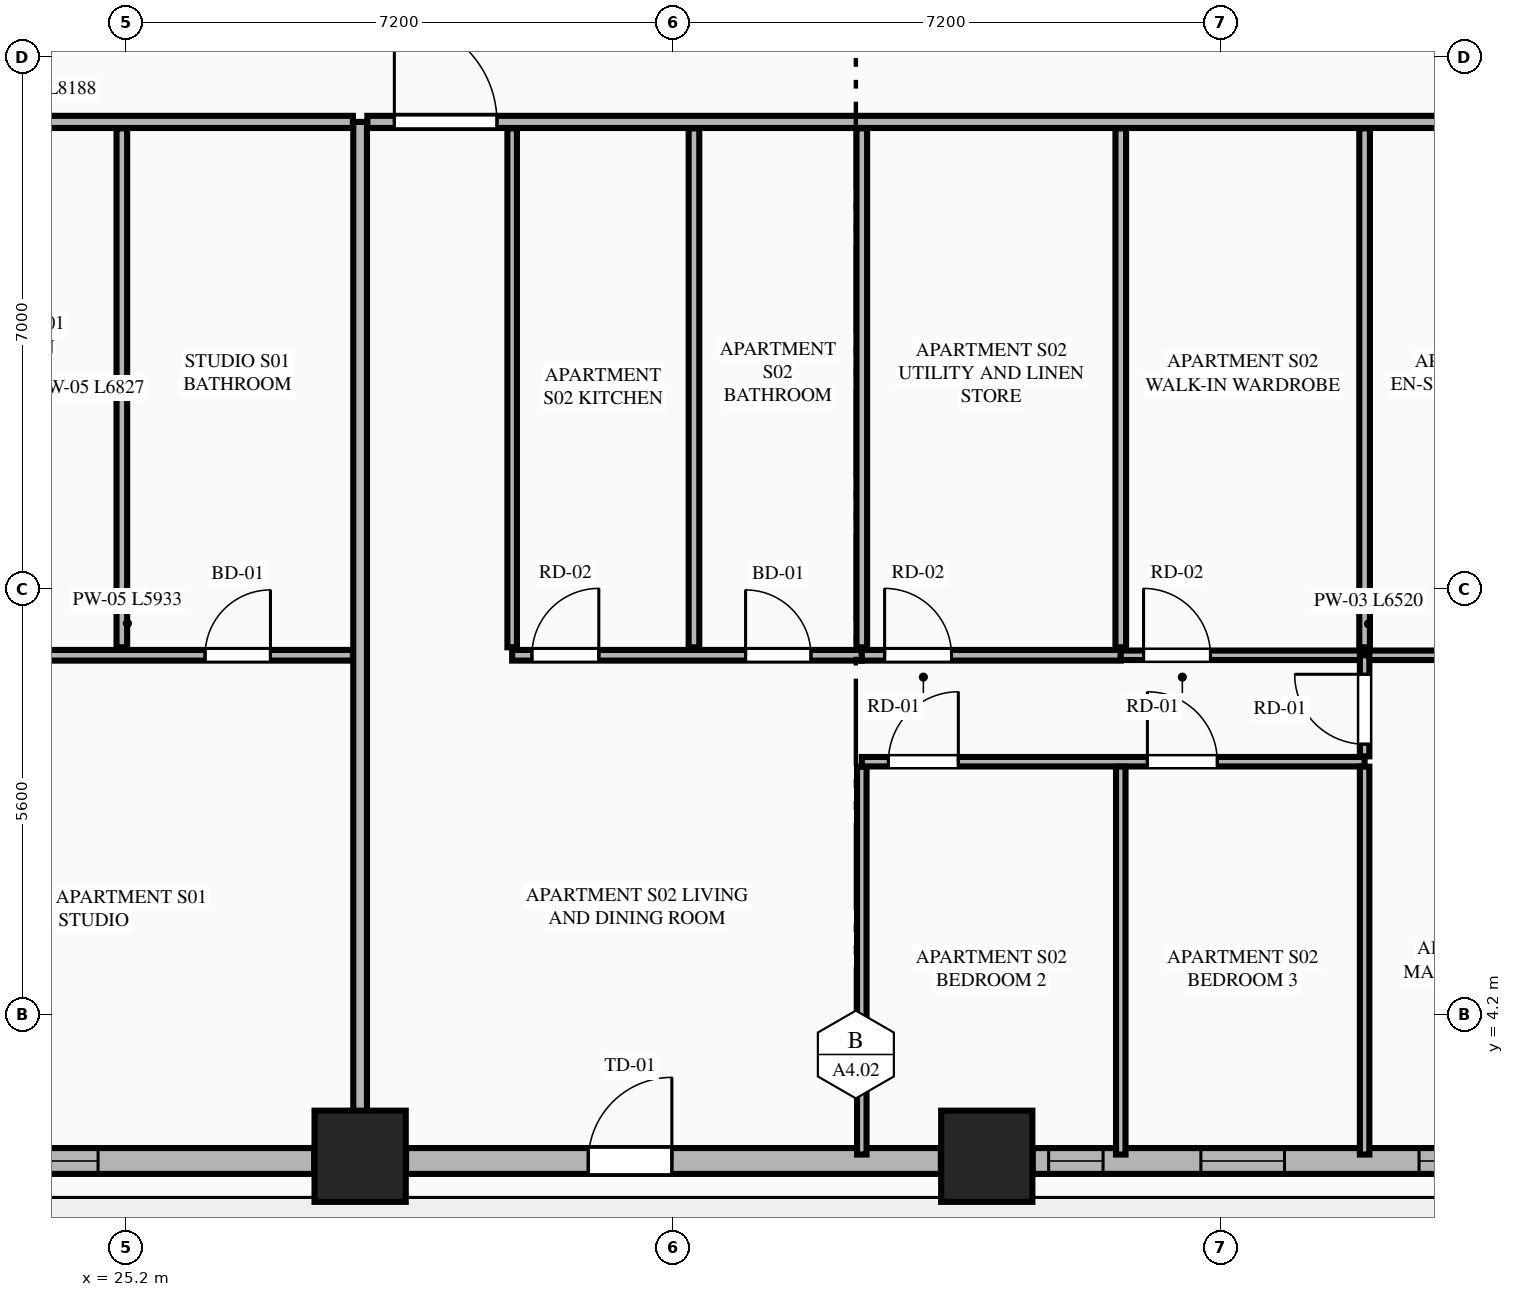
"""IFC4 building model, lengths in metres.
Left out: names, types, materials, properties, quantities, classifications, styles, units other than length and angle.
Written with IfcOpenShell. Run it as: python <this file> out.ifc"""

import sys

from ifc_helpers import new_model, si_unit, direction, frame, frame_2d, origin, origin_2d, place, context, subcontext, project, spatial, rectangle, extrude, element, fill, save


model = new_model("IFC4")
c1 = context("Model", 3, precision=1e-05, world=origin(), true_north=direction((0.0, 1.0)))
c2 = subcontext(c1, "Body", "Model", "MODEL_VIEW")
j1 = project(units=[si_unit("LENGTHUNIT", "METRE"), si_unit("PLANEANGLEUNIT", "RADIAN")], contexts=[c1])
p1 = place(None, origin())
s1 = spatial("IfcSite", under=j1, at=p1, CompositionType="ELEMENT")
p2 = place(p1, origin())
s2 = spatial("IfcBuilding", under=s1, at=p2, CompositionType="ELEMENT")
p3 = place(p2, frame((0.0, 0.0, 32.0)))
s3 = spatial("IfcBuildingStorey", under=s2, at=p3, CompositionType="ELEMENT", Elevation=32.0)
for number, where, z_axis, x_axis in (
    (1, (28.278, 2.342, 0.0), (0.0, 0.0, 1.0), (1.0, 0.0, 0.0)),
    (2, (36.522, 2.342, 0.0), (0.0, 0.0, 1.0), (1.0, 0.0, 0.0)),
):
    element("IfcColumn", number, at=place(p3, frame(where, z_axis=z_axis, x_axis=x_axis)), inside=s3, PredefinedType="COLUMN", context=c2, shape_type="SweptSolid", body=[
        extrude(rectangle(XDim=1.2, YDim=1.2, at=origin_2d()), origin(), (0.0, 0.0, 1.0), 3.55),
    ])
p4 = place(p3, frame((20.887, 2.28, 0.0), z_axis=(0.0, 0.0, 1.0), x_axis=(1.0, 0.0, 0.0)))
e3 = element("IfcWall", 3, at=p4, inside=s3, PredefinedType="STANDARD", context=c2, shape_type="SweptSolid", body=[
    extrude(rectangle(XDim=6.787, YDim=0.34, at=frame_2d((3.394, 0.0))), origin(), (0.0, 0.0, 1.0), 2.787),
])
p5 = place(p4, frame((2.843, 0.0, 0.75)))
e4 = element("IfcOpeningElement", 4, at=p5, cuts=e3, PredefinedType="OPENING", context=c2, shape_type="SweptSolid", body=[
    extrude(rectangle(XDim=1.1, YDim=1.887, at=frame_2d((0.55, 0.943))), frame((0.0, 0.18, 0.0), z_axis=(0.0, -1.0, 0.0), x_axis=(1.0, 0.0, 0.0)), (0.0, 0.0, 1.0), 0.36),
])
p6 = place(p3, frame((28.882, 2.28, 0.0), z_axis=(0.0, 0.0, 1.0), x_axis=(1.0, 0.0, 0.0)))
e5 = element("IfcWall", 5, at=p6, inside=s3, PredefinedType="STANDARD", context=c2, shape_type="SweptSolid", body=[
    extrude(rectangle(XDim=7.036, YDim=0.34, at=frame_2d((3.518, 0.0))), origin(), (0.0, 0.0, 1.0), 2.787),
])
p7 = place(p6, frame((2.397, 0.0, 0.0)))
e6 = element("IfcOpeningElement", 6, at=p7, cuts=e5, PredefinedType="OPENING", context=c2, shape_type="SweptSolid", body=[
    extrude(rectangle(XDim=1.1, YDim=2.25, at=frame_2d((0.55, 1.125))), frame((0.0, 0.18, 0.0), z_axis=(0.0, -1.0, 0.0), x_axis=(1.0, 0.0, 0.0)), (0.0, 0.0, 1.0), 0.36),
])
p8 = place(p3, frame((37.126, 2.28, 0.0), z_axis=(0.0, 0.0, 1.0), x_axis=(1.0, 0.0, 0.0)))
e7 = element("IfcWall", 7, at=p8, inside=s3, PredefinedType="STANDARD", context=c2, shape_type="SweptSolid", body=[
    extrude(rectangle(XDim=6.787, YDim=0.34, at=frame_2d((3.394, 0.0))), origin(), (0.0, 0.0, 1.0), 2.787),
])
p9 = place(p8, frame((2.213, 0.0, 0.75)))
e8 = element("IfcOpeningElement", 8, at=p9, cuts=e7, PredefinedType="OPENING", context=c2, shape_type="SweptSolid", body=[
    extrude(rectangle(XDim=1.1, YDim=1.887, at=frame_2d((0.55, 0.943))), frame((0.0, 0.18, 0.0), z_axis=(0.0, -1.0, 0.0), x_axis=(1.0, 0.0, 0.0)), (0.0, 0.0, 1.0), 0.36),
])
p10 = place(p8, frame((5.083, 0.0, 0.75)))
e9 = element("IfcOpeningElement", 9, at=p10, cuts=e7, PredefinedType="OPENING", context=c2, shape_type="SweptSolid", body=[
    extrude(rectangle(XDim=1.1, YDim=1.887, at=frame_2d((0.55, 0.943))), frame((0.0, 0.18, 0.0), z_axis=(0.0, -1.0, 0.0), x_axis=(1.0, 0.0, 0.0)), (0.0, 0.0, 1.0), 0.36),
])
p11 = place(p8, frame((0.21, 0.0, 0.75)))
e10 = element("IfcOpeningElement", 10, at=p11, cuts=e7, PredefinedType="OPENING", context=c2, shape_type="SweptSolid", body=[
    extrude(rectangle(XDim=0.716, YDim=1.887, at=frame_2d((0.358, 0.943))), frame((0.0, 0.18, 0.0), z_axis=(0.0, -1.0, 0.0), x_axis=(1.0, 0.0, 0.0)), (0.0, 0.0, 1.0), 0.36),
])
p12 = place(p3, frame((28.278, 2.455, 0.0), z_axis=(0.0, 0.0, 1.0), x_axis=(0.0, 1.0, 0.0)))
e11 = element("IfcWall", 11, at=p12, inside=s3, PredefinedType="PARTITIONING", context=c2, shape_type="SweptSolid", body=[
    extrude(rectangle(XDim=13.495, YDim=0.18, at=frame_2d((6.748, 0.0))), origin(), (0.0, 0.0, 1.0), 2.636),
])
p13 = place(p3, frame((19.995, 15.95, 0.0), z_axis=(0.0, 0.0, 1.0), x_axis=(1.0, 0.0, 0.0)))
e12 = element("IfcWall", 12, at=p13, inside=s3, PredefinedType="PARTITIONING", context=c2, shape_type="SweptSolid", body=[
    extrude(rectangle(XDim=8.188, YDim=0.16, at=frame_2d((4.094, 0.0))), origin(), (0.0, 0.0, 1.0), 3.33),
])
p14 = place(p13, frame((0.705, 0.0, 0.0)))
e13 = element("IfcOpeningElement", 13, at=p14, cuts=e12, PredefinedType="OPENING", context=c2, shape_type="SweptSolid", body=[
    extrude(rectangle(XDim=1.02, YDim=2.25, at=frame_2d((0.51, 1.125))), frame((0.0, 0.09, 0.0), z_axis=(0.0, -1.0, 0.0), x_axis=(1.0, 0.0, 0.0)), (0.0, 0.0, 1.0), 0.18),
])
p15 = place(p3, frame((22.25, 8.933, 0.0), z_axis=(0.0, 0.0, 1.0), x_axis=(1.0, 0.0, 0.0)))
e14 = element("IfcWall", 14, at=p15, inside=s3, PredefinedType="PLUMBINGWALL", context=c2, shape_type="SweptSolid", body=[
    extrude(rectangle(XDim=5.933, YDim=0.14, at=frame_2d((2.967, 0.0))), origin(), (0.0, 0.0, 1.0), 3.33),
])
p16 = place(p15, frame((3.988, 0.0, 0.0)))
e15 = element("IfcOpeningElement", 15, at=p16, cuts=e14, PredefinedType="OPENING", context=c2, shape_type="SweptSolid", body=[
    extrude(rectangle(XDim=0.86, YDim=2.1, at=frame_2d((0.43, 1.05))), frame((0.0, 0.08, 0.0), z_axis=(0.0, -1.0, 0.0), x_axis=(1.0, 0.0, 0.0)), (0.0, 0.0, 1.0), 0.16),
])
p17 = place(p15, frame((0.22, 0.0, 0.0)))
e16 = element("IfcOpeningElement", 16, at=p17, cuts=e14, PredefinedType="OPENING", context=c2, shape_type="SweptSolid", body=[
    extrude(rectangle(XDim=0.88, YDim=2.15, at=frame_2d((0.44, 1.075))), frame((0.0, 0.08, 0.0), z_axis=(0.0, -1.0, 0.0), x_axis=(1.0, 0.0, 0.0)), (0.0, 0.0, 1.0), 0.16),
])
p18 = place(p3, frame((25.143, 9.038, 0.0), z_axis=(0.0, 0.0, 1.0), x_axis=(0.0, 1.0, 0.0)))
e17 = element("IfcWall", 17, at=p18, inside=s3, PredefinedType="PLUMBINGWALL", context=c2, shape_type="SweptSolid", body=[
    extrude(rectangle(XDim=6.827, YDim=0.14, at=frame_2d((3.414, 0.0))), origin(), (0.0, 0.0, 1.0), 3.33),
])
p19 = place(p3, frame((28.373, 15.95, 0.0), z_axis=(0.0, 0.0, 1.0), x_axis=(1.0, 0.0, 0.0)))
e18 = element("IfcWall", 18, at=p19, inside=s3, PredefinedType="PARTITIONING", context=c2, shape_type="SweptSolid", body=[
    extrude(rectangle(XDim=16.432, YDim=0.16, at=frame_2d((8.216, 0.0))), origin(), (0.0, 0.0, 1.0), 3.33),
])
p20 = place(p19, frame((0.355, 0.0, 0.0)))
e19 = element("IfcOpeningElement", 19, at=p20, cuts=e18, PredefinedType="OPENING", context=c2, shape_type="SweptSolid", body=[
    extrude(rectangle(XDim=1.35, YDim=2.35, at=frame_2d((0.675, 1.175))), frame((0.0, 0.09, 0.0), z_axis=(0.0, -1.0, 0.0), x_axis=(1.0, 0.0, 0.0)), (0.0, 0.0, 1.0), 0.18),
])
p21 = place(p3, frame((30.278, 9.038, 0.0), z_axis=(0.0, 0.0, 1.0), x_axis=(0.0, 1.0, 0.0)))
e20 = element("IfcWall", 20, at=p21, inside=s3, PredefinedType="PARTITIONING", context=c2, shape_type="SweptSolid", body=[
    extrude(rectangle(XDim=6.827, YDim=0.125, at=frame_2d((3.414, 0.0))), origin(), (0.0, 0.0, 1.0), 3.33),
])
p22 = place(p3, frame((30.278, 8.933, 0.0), z_axis=(0.0, 0.0, 1.0), x_axis=(1.0, 0.0, 0.0)))
e21 = element("IfcWall", 21, at=p22, inside=s3, PredefinedType="PLUMBINGWALL", context=c2, shape_type="SweptSolid", body=[
    extrude(rectangle(XDim=4.6, YDim=0.14, at=frame_2d((2.3, 0.0))), origin(), (0.0, 0.0, 1.0), 3.33),
])
p23 = place(p22, frame((3.071, 0.0, 0.0)))
e22 = element("IfcOpeningElement", 22, at=p23, cuts=e21, PredefinedType="OPENING", context=c2, shape_type="SweptSolid", body=[
    extrude(rectangle(XDim=0.86, YDim=2.1, at=frame_2d((0.43, 1.05))), frame((0.0, 0.08, 0.0), z_axis=(0.0, -1.0, 0.0), x_axis=(1.0, 0.0, 0.0)), (0.0, 0.0, 1.0), 0.16),
])
p24 = place(p22, frame((0.26, 0.0, 0.0)))
e23 = element("IfcOpeningElement", 23, at=p24, cuts=e21, PredefinedType="OPENING", context=c2, shape_type="SweptSolid", body=[
    extrude(rectangle(XDim=0.88, YDim=2.15, at=frame_2d((0.44, 1.075))), frame((0.0, 0.08, 0.0), z_axis=(0.0, -1.0, 0.0), x_axis=(1.0, 0.0, 0.0)), (0.0, 0.0, 1.0), 0.16),
])
p25 = place(p3, frame((34.878, 8.933, 0.0), z_axis=(0.0, 0.0, 1.0), x_axis=(1.0, 0.0, 0.0)))
e24 = element("IfcWall", 24, at=p25, inside=s3, PredefinedType="PLUMBINGWALL", context=c2, shape_type="SweptSolid", body=[
    extrude(rectangle(XDim=3.407, YDim=0.14, at=frame_2d((1.704, 0.0))), origin(), (0.0, 0.0, 1.0), 3.33),
])
p26 = place(p25, frame((0.3, 0.0, 0.0)))
e25 = element("IfcOpeningElement", 25, at=p26, cuts=e24, PredefinedType="OPENING", context=c2, shape_type="SweptSolid", body=[
    extrude(rectangle(XDim=0.88, YDim=2.15, at=frame_2d((0.44, 1.075))), frame((0.0, 0.08, 0.0), z_axis=(0.0, -1.0, 0.0), x_axis=(1.0, 0.0, 0.0)), (0.0, 0.0, 1.0), 0.16),
])
p27 = place(p3, frame((38.285, 8.933, 0.0), z_axis=(0.0, 0.0, 1.0), x_axis=(1.0, 0.0, 0.0)))
e26 = element("IfcWall", 26, at=p27, inside=s3, PredefinedType="PARTITIONING", context=c2, shape_type="SweptSolid", body=[
    extrude(rectangle(XDim=6.52, YDim=0.125, at=frame_2d((3.26, 0.0))), origin(), (0.0, 0.0, 1.0), 3.33),
])
p28 = place(p27, frame((4.439, 0.0, 0.0)))
e27 = element("IfcOpeningElement", 27, at=p28, cuts=e26, PredefinedType="OPENING", context=c2, shape_type="SweptSolid", body=[
    extrude(rectangle(XDim=0.86, YDim=2.1, at=frame_2d((0.43, 1.05))), frame((0.0, 0.073, 0.0), z_axis=(0.0, -1.0, 0.0), x_axis=(1.0, 0.0, 0.0)), (0.0, 0.0, 1.0), 0.145),
])
p29 = place(p27, frame((0.3, 0.0, 0.0)))
e28 = element("IfcOpeningElement", 28, at=p29, cuts=e26, PredefinedType="OPENING", context=c2, shape_type="SweptSolid", body=[
    extrude(rectangle(XDim=0.88, YDim=2.15, at=frame_2d((0.44, 1.075))), frame((0.0, 0.073, 0.0), z_axis=(0.0, -1.0, 0.0), x_axis=(1.0, 0.0, 0.0)), (0.0, 0.0, 1.0), 0.145),
])
p30 = place(p3, frame((32.67, 9.038, 0.0), z_axis=(0.0, 0.0, 1.0), x_axis=(0.0, 1.0, 0.0)))
e29 = element("IfcWall", 29, at=p30, inside=s3, PredefinedType="PLUMBINGWALL", context=c2, shape_type="SweptSolid", body=[
    extrude(rectangle(XDim=6.827, YDim=0.14, at=frame_2d((3.414, 0.0))), origin(), (0.0, 0.0, 1.0), 3.33),
])
p31 = place(p3, frame((34.878, 2.365, 0.0), z_axis=(0.0, 0.0, 1.0), x_axis=(0.0, 1.0, 0.0)))
e30 = element("IfcWall", 30, at=p31, inside=s3, PredefinedType="PARTITIONING", context=c2, shape_type="SweptSolid", body=[
    extrude(rectangle(XDim=5.103, YDim=0.125, at=frame_2d((2.552, 0.0))), origin(), (0.0, 0.0, 1.0), 3.33),
])
p32 = place(p3, frame((34.878, 7.533, 0.0), z_axis=(0.0, 0.0, 1.0), x_axis=(1.0, 0.0, 0.0)))
e31 = element("IfcWall", 31, at=p32, inside=s3, PredefinedType="PARTITIONING", context=c2, shape_type="SweptSolid", body=[
    extrude(rectangle(XDim=6.615, YDim=0.125, at=frame_2d((3.308, 0.0))), origin(), (0.0, 0.0, 1.0), 3.33),
])
p33 = place(p32, frame((0.35, 0.0, 0.0)))
e32 = element("IfcOpeningElement", 32, at=p33, cuts=e31, PredefinedType="OPENING", context=c2, shape_type="SweptSolid", body=[
    extrude(rectangle(XDim=0.92, YDim=2.15, at=frame_2d((0.46, 1.075))), frame((0.0, 0.073, 0.0), z_axis=(0.0, -1.0, 0.0), x_axis=(1.0, 0.0, 0.0)), (0.0, 0.0, 1.0), 0.145),
])
p34 = place(p32, frame((3.757, 0.0, 0.0)))
e33 = element("IfcOpeningElement", 33, at=p34, cuts=e31, PredefinedType="OPENING", context=c2, shape_type="SweptSolid", body=[
    extrude(rectangle(XDim=0.92, YDim=2.15, at=frame_2d((0.46, 1.075))), frame((0.0, 0.073, 0.0), z_axis=(0.0, -1.0, 0.0), x_axis=(1.0, 0.0, 0.0)), (0.0, 0.0, 1.0), 0.145),
])
p35 = place(p3, frame((41.493, 7.603, 0.0), z_axis=(0.0, 0.0, 1.0), x_axis=(0.0, 1.0, 0.0)))
e34 = element("IfcWall", 34, at=p35, inside=s3, PredefinedType="PARTITIONING", context=c2, shape_type="SweptSolid", body=[
    extrude(rectangle(XDim=1.33, YDim=0.125, at=frame_2d((0.665, 0.0))), origin(), (0.0, 0.0, 1.0), 3.33),
])
p36 = place(p35, frame((0.16, 0.0, 0.0)))
e35 = element("IfcOpeningElement", 35, at=p36, cuts=e34, PredefinedType="OPENING", context=c2, shape_type="SweptSolid", body=[
    extrude(rectangle(XDim=0.92, YDim=2.15, at=frame_2d((0.46, 1.075))), frame((0.0, 0.073, 0.0), z_axis=(0.0, -1.0, 0.0), x_axis=(1.0, 0.0, 0.0)), (0.0, 0.0, 1.0), 0.145),
])
for number, where, z_axis, x_axis in (
    (36, (34.878, 9.038, 0.0), (0.0, 0.0, 1.0), (0.0, 1.0, 0.0)),
    (37, (38.285, 9.038, 0.0), (0.0, 0.0, 1.0), (0.0, 1.0, 0.0)),
):
    element("IfcWall", number, at=place(p3, frame(where, z_axis=z_axis, x_axis=x_axis)), inside=s3, PredefinedType="PLUMBINGWALL", context=c2, shape_type="SweptSolid", body=[
        extrude(rectangle(XDim=6.827, YDim=0.14, at=frame_2d((3.414, 0.0))), origin(), (0.0, 0.0, 1.0), 3.33),
    ])
for number, where, z_axis, x_axis in (
    (38, (38.285, 2.365, 0.0), (0.0, 0.0, 1.0), (0.0, 1.0, 0.0)),
    (39, (41.493, 2.365, 0.0), (0.0, 0.0, 1.0), (0.0, 1.0, 0.0)),
):
    element("IfcWall", number, at=place(p3, frame(where, z_axis=z_axis, x_axis=x_axis)), inside=s3, PredefinedType="PARTITIONING", context=c2, shape_type="SweptSolid", body=[
        extrude(rectangle(XDim=5.103, YDim=0.125, at=frame_2d((2.552, 0.0))), origin(), (0.0, 0.0, 1.0), 3.33),
    ])
p37 = place(p3, frame((41.493, 9.038, 0.0), z_axis=(0.0, 0.0, 1.0), x_axis=(0.0, 1.0, 0.0)))
e40 = element("IfcWall", 40, at=p37, inside=s3, PredefinedType="PLUMBINGWALL", context=c2, shape_type="SweptSolid", body=[
    extrude(rectangle(XDim=6.827, YDim=0.14, at=frame_2d((3.414, 0.0))), origin(), (0.0, 0.0, 1.0), 3.33),
])
p38 = place(p5, origin())
e41 = element("IfcWindow", 41, at=p38, inside=s3, PartitioningType="SINGLE_PANEL", PredefinedType="WINDOW", context=c2, shape_type="SweptSolid", body=[
    extrude(rectangle(XDim=1.1, YDim=1.887, at=frame_2d((0.55, 0.943))), frame((0.0, 0.03, 0.0), z_axis=(0.0, -1.0, 0.0), x_axis=(1.0, 0.0, 0.0)), (0.0, 0.0, 1.0), 0.06),
])
fill(e4, e41)
p39 = place(p7, origin())
e42 = element("IfcDoor", 42, at=p39, inside=s3, OperationType="SINGLE_SWING_RIGHT", PredefinedType="DOOR", context=c2, shape_type="SweptSolid", body=[
    extrude(rectangle(XDim=1.1, YDim=2.25, at=frame_2d((0.55, 1.125))), frame((0.0, 0.025, 0.0), z_axis=(0.0, -1.0, 0.0), x_axis=(1.0, 0.0, 0.0)), (0.0, 0.0, 1.0), 0.05),
])
fill(e6, e42)
p40 = place(p9, origin())
e43 = element("IfcWindow", 43, at=p40, inside=s3, PartitioningType="SINGLE_PANEL", PredefinedType="WINDOW", context=c2, shape_type="SweptSolid", body=[
    extrude(rectangle(XDim=1.1, YDim=1.887, at=frame_2d((0.55, 0.943))), frame((0.0, 0.03, 0.0), z_axis=(0.0, -1.0, 0.0), x_axis=(1.0, 0.0, 0.0)), (0.0, 0.0, 1.0), 0.06),
])
fill(e8, e43)
p41 = place(p16, origin())
e44 = element("IfcDoor", 44, at=p41, inside=s3, OperationType="SINGLE_SWING_RIGHT", PredefinedType="DOOR", context=c2, shape_type="SweptSolid", body=[
    extrude(rectangle(XDim=0.86, YDim=2.1, at=frame_2d((0.43, 1.05))), frame((0.0, 0.025, 0.0), z_axis=(0.0, -1.0, 0.0), x_axis=(1.0, 0.0, 0.0)), (0.0, 0.0, 1.0), 0.05),
])
fill(e15, e44)
p42 = place(p23, origin())
e45 = element("IfcDoor", 45, at=p42, inside=s3, OperationType="SINGLE_SWING_LEFT", PredefinedType="DOOR", context=c2, shape_type="SweptSolid", body=[
    extrude(rectangle(XDim=0.86, YDim=2.1, at=frame_2d((0.43, 1.05))), frame((0.0, 0.025, 0.0), z_axis=(0.0, -1.0, 0.0), x_axis=(1.0, 0.0, 0.0)), (0.0, 0.0, 1.0), 0.05),
])
fill(e22, e45)
p43 = place(p20, origin())
e46 = element("IfcDoor", 46, at=p43, inside=s3, OperationType="SINGLE_SWING_LEFT", PredefinedType="DOOR", context=c2, shape_type="SweptSolid", body=[
    extrude(rectangle(XDim=1.35, YDim=2.35, at=frame_2d((0.675, 1.175))), frame((0.0, 0.025, 0.0), z_axis=(0.0, -1.0, 0.0), x_axis=(1.0, 0.0, 0.0)), (0.0, 0.0, 1.0), 0.05),
])
fill(e19, e46)
p44 = place(p24, origin())
e47 = element("IfcDoor", 47, at=p44, inside=s3, OperationType="SINGLE_SWING_RIGHT", PredefinedType="DOOR", context=c2, shape_type="SweptSolid", body=[
    extrude(rectangle(XDim=0.88, YDim=2.15, at=frame_2d((0.44, 1.075))), frame((0.0, 0.025, 0.0), z_axis=(0.0, -1.0, 0.0), x_axis=(1.0, 0.0, 0.0)), (0.0, 0.0, 1.0), 0.05),
])
fill(e23, e47)
p45 = place(p26, origin())
e48 = element("IfcDoor", 48, at=p45, inside=s3, OperationType="SINGLE_SWING_LEFT", PredefinedType="DOOR", context=c2, shape_type="SweptSolid", body=[
    extrude(rectangle(XDim=0.88, YDim=2.15, at=frame_2d((0.44, 1.075))), frame((0.0, 0.025, 0.0), z_axis=(0.0, -1.0, 0.0), x_axis=(1.0, 0.0, 0.0)), (0.0, 0.0, 1.0), 0.05),
])
fill(e25, e48)
p46 = place(p33, origin())
e49 = element("IfcDoor", 49, at=p46, inside=s3, OperationType="SINGLE_SWING_RIGHT", PredefinedType="DOOR", context=c2, shape_type="SweptSolid", body=[
    extrude(rectangle(XDim=0.92, YDim=2.15, at=frame_2d((0.46, 1.075))), frame((0.0, 0.025, 0.0), z_axis=(0.0, -1.0, 0.0), x_axis=(1.0, 0.0, 0.0)), (0.0, 0.0, 1.0), 0.05),
])
fill(e32, e49)
p47 = place(p34, origin())
e50 = element("IfcDoor", 50, at=p47, inside=s3, OperationType="SINGLE_SWING_LEFT", PredefinedType="DOOR", context=c2, shape_type="SweptSolid", body=[
    extrude(rectangle(XDim=0.92, YDim=2.15, at=frame_2d((0.46, 1.075))), frame((0.0, 0.025, 0.0), z_axis=(0.0, -1.0, 0.0), x_axis=(1.0, 0.0, 0.0)), (0.0, 0.0, 1.0), 0.05),
])
fill(e33, e50)
p48 = place(p36, origin())
e51 = element("IfcDoor", 51, at=p48, inside=s3, OperationType="SINGLE_SWING_RIGHT", PredefinedType="DOOR", context=c2, shape_type="SweptSolid", body=[
    extrude(rectangle(XDim=0.92, YDim=2.15, at=frame_2d((0.46, 1.075))), frame((0.0, 0.025, 0.0), z_axis=(0.0, -1.0, 0.0), x_axis=(1.0, 0.0, 0.0)), (0.0, 0.0, 1.0), 0.05),
])
fill(e35, e51)
p49 = place(p29, origin())
e52 = element("IfcDoor", 52, at=p49, inside=s3, OperationType="SINGLE_SWING_LEFT", PredefinedType="DOOR", context=c2, shape_type="SweptSolid", body=[
    extrude(rectangle(XDim=0.88, YDim=2.15, at=frame_2d((0.44, 1.075))), frame((0.0, 0.025, 0.0), z_axis=(0.0, -1.0, 0.0), x_axis=(1.0, 0.0, 0.0)), (0.0, 0.0, 1.0), 0.05),
])
fill(e28, e52)
p50 = place(p10, origin())
e53 = element("IfcWindow", 53, at=p50, inside=s3, PartitioningType="SINGLE_PANEL", PredefinedType="WINDOW", context=c2, shape_type="SweptSolid", body=[
    extrude(rectangle(XDim=1.1, YDim=1.887, at=frame_2d((0.55, 0.943))), frame((0.0, 0.03, 0.0), z_axis=(0.0, -1.0, 0.0), x_axis=(1.0, 0.0, 0.0)), (0.0, 0.0, 1.0), 0.06),
])
fill(e9, e53)
p51 = place(p11, origin())
e54 = element("IfcWindow", 54, at=p51, inside=s3, PartitioningType="SINGLE_PANEL", PredefinedType="WINDOW", context=c2, shape_type="SweptSolid", body=[
    extrude(rectangle(XDim=0.716, YDim=1.887, at=frame_2d((0.358, 0.943))), frame((0.0, 0.03, 0.0), z_axis=(0.0, -1.0, 0.0), x_axis=(1.0, 0.0, 0.0)), (0.0, 0.0, 1.0), 0.06),
])
fill(e10, e54)
save(model, sys.argv[1])
